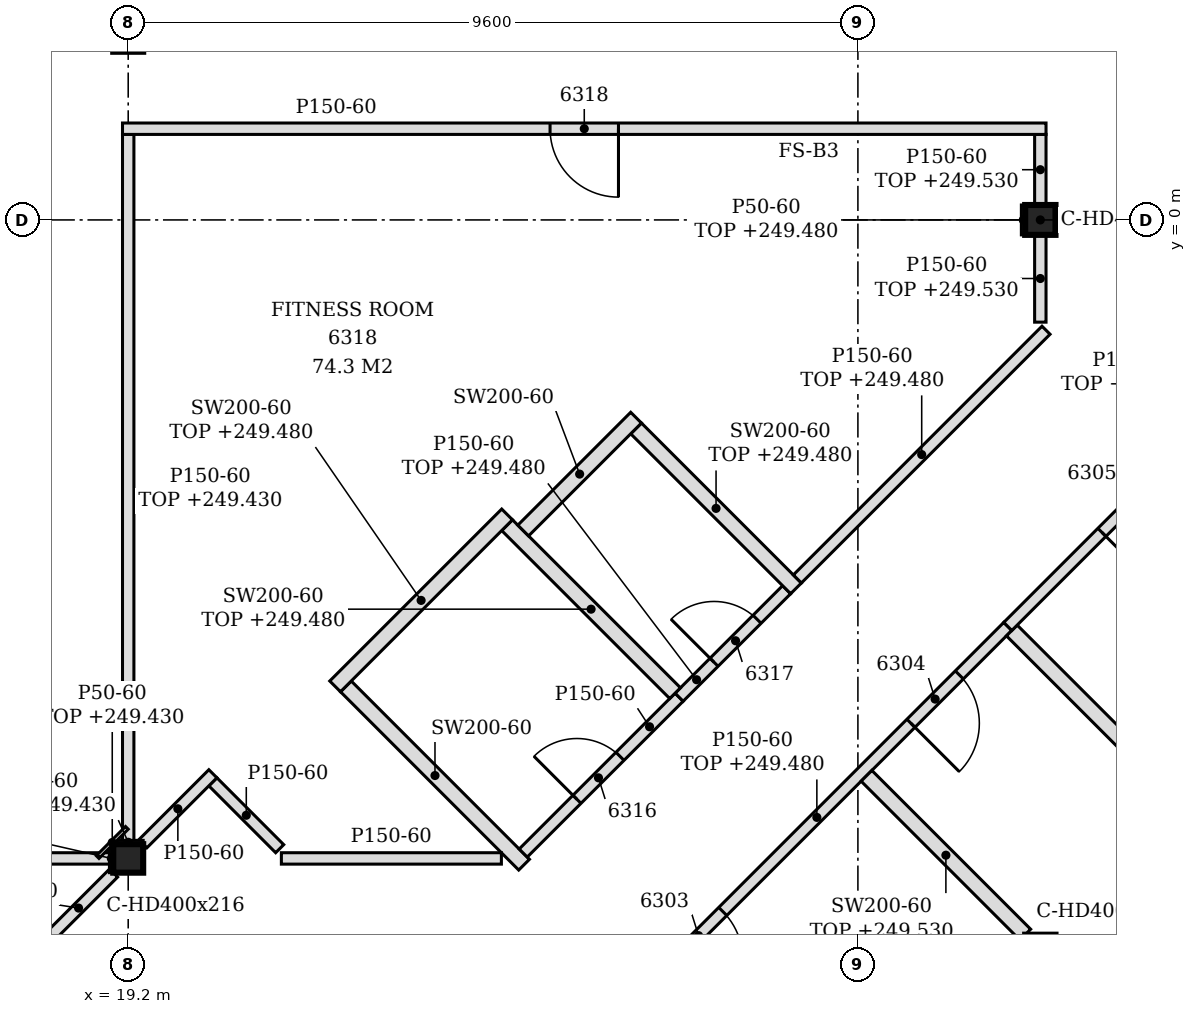
"""IFC4 building model, lengths in metres.
Left out: names, types, materials, properties, quantities, classifications, styles, units other than length and angle.
Written with IfcOpenShell. Run it as: python <this file> out.ifc"""

import sys

from ifc_helpers import new_model, si_unit, direction, frame, frame_2d, origin, origin_2d, place, context, subcontext, project, spatial, polyline, rectangle, i_section, outline, extrude, element, fill, save


model = new_model("IFC4")
c1 = context("Model", 3, precision=1e-05, world=origin(), true_north=direction((0.0, 1.0)))
c2 = subcontext(c1, "Body", "Model", "MODEL_VIEW")
j1 = project(units=[si_unit("LENGTHUNIT", "METRE"), si_unit("PLANEANGLEUNIT", "RADIAN")], contexts=[c1])
p1 = place(None, origin())
s1 = spatial("IfcSite", under=j1, at=p1, CompositionType="ELEMENT")
p2 = place(p1, origin())
s2 = spatial("IfcBuilding", under=s1, at=p2, CompositionType="ELEMENT")
p3 = place(p2, frame((0.0, 0.0, 246.6)))
s3 = spatial("IfcBuildingStorey", under=s2, at=p3, CompositionType="ELEMENT", Elevation=246.6)
p4 = place(p3, frame((19.2, -8.4, -0.15), z_axis=(0.0, 0.0, 1.0), x_axis=(1.0, 0.0, 0.0)))
e1 = element("IfcColumn", 1, at=p4, inside=s3, PredefinedType="COLUMN", context=c2, shape_type="SweptSolid", body=[
    extrude(i_section(OverallWidth=0.394, OverallDepth=0.375, WebThickness=0.017, FlangeThickness=0.028, FilletRadius=0.015, at=origin_2d()), origin(), (0.0, 0.0, 1.0), 3.6),
])
p5 = place(p3, frame((31.2, 0.0, -0.15), z_axis=(0.0, 0.0, 1.0), x_axis=(1.0, 0.0, 0.0)))
e2 = element("IfcColumn", 2, at=p5, inside=s3, PredefinedType="COLUMN", context=c2, shape_type="SweptSolid", body=[
    extrude(i_section(OverallWidth=0.399, OverallDepth=0.393, WebThickness=0.023, FlangeThickness=0.037, FilletRadius=0.015, at=origin_2d()), origin(), (0.0, 0.0, 1.0), 3.6),
])
p6 = place(p3, frame((24.619, -11.501, 0.0), z_axis=(0.0, 0.0, 1.0), x_axis=(0.707106781187, 0.707106781187, 0.0)))
e3 = element("IfcWall", 3, at=p6, inside=s3, PredefinedType="PARTITIONING", context=c2, shape_type="SweptSolid", body=[
    extrude(rectangle(XDim=8.702, YDim=0.15, at=frame_2d((4.351, 0.0))), origin(), (0.0, 0.0, 1.0), 2.88),
])
p7 = place(p6, frame((2.499, 0.0, 0.0)))
e4 = element("IfcOpeningElement", 4, at=p7, cuts=e3, PredefinedType="OPENING", context=c2, shape_type="SweptSolid", body=[
    extrude(rectangle(XDim=0.9, YDim=2.1, at=frame_2d((0.45, 1.05))), frame((0.0, 0.085, 0.0), z_axis=(0.0, -1.0, 0.0), x_axis=(1.0, 0.0, 0.0)), (0.0, 0.0, 1.0), 0.17),
])
p8 = place(p6, frame((6.9, 0.0, 0.0)))
e5 = element("IfcOpeningElement", 5, at=p8, cuts=e3, PredefinedType="OPENING", context=c2, shape_type="SweptSolid", body=[
    extrude(rectangle(XDim=0.9, YDim=2.1, at=frame_2d((0.45, 1.05))), frame((0.0, 0.085, 0.0), z_axis=(0.0, -1.0, 0.0), x_axis=(1.0, 0.0, 0.0)), (0.0, 0.0, 1.0), 0.17),
])
p9 = place(p3, frame((35.873, -10.449, 0.0), z_axis=(0.0, 0.0, 1.0), x_axis=(-0.707089680867, 0.707123881093, 0.0)))
e6 = element("IfcWall", 6, at=p9, inside=s3, PredefinedType="PARTITIONING", context=c2, shape_type="SweptSolid", body=[
    extrude(rectangle(XDim=7.139, YDim=0.2, at=frame_2d((3.569, 0.0))), origin(), (0.0, 0.0, 1.0), 2.93),
])
p10 = place(p3, frame((18.086, -9.514, 0.0), z_axis=(0.0, 0.0, 1.0), x_axis=(0.707200419109, 0.707013130862, 0.0)))
e7 = element("IfcWall", 7, at=p10, inside=s3, PredefinedType="PARTITIONING", context=c2, shape_type="SweptSolid", body=[
    extrude(rectangle(XDim=1.303, YDim=0.15, at=frame_2d((0.652, 0.0))), origin(), (0.0, 0.0, 1.0), 3.45),
])
p11 = place(p3, frame((31.002, -9.402, 0.0), z_axis=(0.0, 0.0, 1.0), x_axis=(-0.707065460118, 0.70714809984, 0.0)))
e8 = element("IfcWall", 8, at=p11, inside=s3, PredefinedType="PARTITIONING", context=c2, shape_type="SweptSolid", body=[
    extrude(rectangle(XDim=2.954, YDim=0.2, at=frame_2d((1.477, 0.0))), origin(), (0.0, 0.0, 1.0), 2.93),
])
p12 = place(p3, frame((24.408, -8.482, 0.0), z_axis=(0.0, 0.0, 1.0), x_axis=(-0.70692272029, 0.707290794184, 0.0)))
e9 = element("IfcWall", 9, at=p12, inside=s3, PredefinedType="PARTITIONING", context=c2, shape_type="SweptSolid", body=[
    extrude(rectangle(XDim=3.316, YDim=0.2, at=frame_2d((1.658, 0.0))), origin(), (0.0, 0.0, 1.0), 3.45),
])
p13 = place(p3, frame((7.397, -8.4, 0.0), z_axis=(0.0, 0.0, 1.0), x_axis=(1.0, 0.0, 0.0)))
e10 = element("IfcWall", 10, at=p13, inside=s3, PredefinedType="PARTITIONING", context=c2, shape_type="SweptSolid", body=[
    extrude(rectangle(XDim=11.606, YDim=0.15, at=frame_2d((5.803, 0.0))), origin(), (0.0, 0.0, 1.0), 2.83),
])
p14 = place(p3, frame((21.215, -8.4, 0.0), z_axis=(0.0, 0.0, 1.0), x_axis=(1.0, 0.0, 0.0)))
e11 = element("IfcWall", 11, at=p14, inside=s3, PredefinedType="PARTITIONING", context=c2, shape_type="SweptSolid", body=[
    extrude(rectangle(XDim=2.895, YDim=0.15, at=frame_2d((1.447, 0.0))), origin(), (0.0, 0.0, 1.0), 3.45),
])
p15 = place(p3, frame((21.193, -8.272, 0.0), z_axis=(0.0, 0.0, 1.0), x_axis=(-0.706812296552, 0.70740114323, 0.0)))
e12 = element("IfcWall", 12, at=p15, inside=s3, PredefinedType="PARTITIONING", context=c2, shape_type="SweptSolid", body=[
    extrude(rectangle(XDim=1.244, YDim=0.15, at=frame_2d((0.622, 0.0))), origin(), (0.0, 0.0, 1.0), 3.45),
])
p16 = place(p3, frame((24.397, -8.329, 0.0), z_axis=(0.0, 0.0, 1.0), x_axis=(0.707275119896, 0.706938402391, 0.0)))
e13 = element("IfcWall", 13, at=p16, inside=s3, PredefinedType="PARTITIONING", context=c2, shape_type="SweptSolid", body=[
    extrude(rectangle(XDim=2.9, YDim=0.15, at=frame_2d((1.45, 0.0))), origin(), (0.0, 0.0, 1.0), 3.45),
])
p17 = place(p16, frame((1.0, 0.0, 0.0)))
e14 = element("IfcOpeningElement", 14, at=p17, cuts=e13, PredefinedType="OPENING", context=c2, shape_type="SweptSolid", body=[
    extrude(rectangle(XDim=0.8, YDim=2.1, at=frame_2d((0.4, 1.05))), frame((0.0, 0.085, 0.0), z_axis=(0.0, -1.0, 0.0), x_axis=(1.0, 0.0, 0.0)), (0.0, 0.0, 1.0), 0.17),
])
p18 = place(p3, frame((19.2, -8.212, 0.0), z_axis=(0.0, 0.0, 1.0), x_axis=(0.0, 1.0, 0.0)))
e15 = element("IfcWall", 15, at=p18, inside=s3, PredefinedType="PARTITIONING", context=c2, shape_type="SweptSolid", body=[
    extrude(rectangle(XDim=9.337, YDim=0.15, at=frame_2d((4.669, 0.0))), origin(), (0.0, 0.0, 1.0), 2.83),
])
p19 = place(p3, frame((19.392, -8.208, 0.0), z_axis=(0.0, 0.0, 1.0), x_axis=(0.707106781187, 0.707106781187, 0.0)))
e16 = element("IfcWall", 16, at=p19, inside=s3, PredefinedType="PARTITIONING", context=c2, shape_type="SweptSolid", body=[
    extrude(rectangle(XDim=1.304, YDim=0.15, at=frame_2d((0.652, 0.0))), origin(), (0.0, 0.0, 1.0), 3.45),
])
p20 = place(p3, frame((26.448, -6.279, 0.0), z_axis=(0.0, 0.0, 1.0), x_axis=(0.707106781187, 0.707106781187, 0.0)))
e17 = element("IfcWall", 17, at=p20, inside=s3, PredefinedType="PARTITIONING", context=c2, shape_type="SweptSolid", body=[
    extrude(rectangle(XDim=2.0, YDim=0.15, at=frame_2d((1.0, 0.0))), origin(), (0.0, 0.0, 1.0), 2.88),
])
p21 = place(p20, frame((0.65, 0.0, 0.0)))
e18 = element("IfcOpeningElement", 18, at=p21, cuts=e17, PredefinedType="OPENING", context=c2, shape_type="SweptSolid", body=[
    extrude(rectangle(XDim=0.8, YDim=2.1, at=frame_2d((0.4, 1.05))), frame((0.0, 0.085, 0.0), z_axis=(0.0, -1.0, 0.0), x_axis=(1.0, 0.0, 0.0)), (0.0, 0.0, 1.0), 0.17),
])
p22 = place(p3, frame((26.395, -6.226, 0.0), z_axis=(0.0, 0.0, 1.0), x_axis=(-0.707067728538, 0.707145831678, 0.0)))
e19 = element("IfcWall", 19, at=p22, inside=s3, PredefinedType="PARTITIONING", context=c2, shape_type="SweptSolid", body=[
    extrude(rectangle(XDim=3.126, YDim=0.2, at=frame_2d((1.563, 0.0))), origin(), (0.0, 0.0, 1.0), 2.88),
])
p23 = place(p3, frame((21.922, -6.137, 0.0), z_axis=(0.0, 0.0, 1.0), x_axis=(0.707106781187, 0.707106781187, 0.0)))
e20 = element("IfcWall", 20, at=p23, inside=s3, PredefinedType="PARTITIONING", context=c2, shape_type="SweptSolid", body=[
    extrude(rectangle(XDim=3.2, YDim=0.2, at=frame_2d((1.6, 0.0))), origin(), (0.0, 0.0, 1.0), 2.88),
])
p24 = place(p3, frame((30.772, -5.348, 0.0), z_axis=(0.0, 0.0, 1.0), x_axis=(0.70724543229, 0.706968102891, 0.0)))
e21 = element("IfcWall", 21, at=p24, inside=s3, PredefinedType="PARTITIONING", context=c2, shape_type="SweptSolid", body=[
    extrude(rectangle(XDim=4.402, YDim=0.15, at=frame_2d((2.201, 0.0))), origin(), (0.0, 0.0, 1.0), 2.93),
])
p25 = place(p24, frame((1.751, 0.0, 0.0)))
e22 = element("IfcOpeningElement", 22, at=p25, cuts=e21, PredefinedType="OPENING", context=c2, shape_type="SweptSolid", body=[
    extrude(rectangle(XDim=0.9, YDim=2.1, at=frame_2d((0.45, 1.05))), frame((0.0, 0.085, 0.0), z_axis=(0.0, -1.0, 0.0), x_axis=(1.0, 0.0, 0.0)), (0.0, 0.0, 1.0), 0.17),
])
p26 = place(p3, frame((27.986, -4.847, 0.0), z_axis=(0.0, 0.0, 1.0), x_axis=(-0.707147797851, 0.707065762143, 0.0)))
e23 = element("IfcWall", 23, at=p26, inside=s3, PredefinedType="PARTITIONING", context=c2, shape_type="SweptSolid", body=[
    extrude(rectangle(XDim=2.976, YDim=0.2, at=frame_2d((1.488, 0.0))), origin(), (0.0, 0.0, 1.0), 2.88),
])
p27 = place(p3, frame((28.004, -4.723, 0.0), z_axis=(0.0, 0.0, 1.0), x_axis=(0.706974860744, 0.707238677022, 0.0)))
e24 = element("IfcWall", 24, at=p27, inside=s3, PredefinedType="PARTITIONING", context=c2, shape_type="SweptSolid", body=[
    extrude(rectangle(XDim=4.627, YDim=0.15, at=frame_2d((2.313, 0.0))), origin(), (0.0, 0.0, 1.0), 2.88),
])
p28 = place(p3, frame((24.397, -4.086, 0.0), z_axis=(0.0, 0.0, 1.0), x_axis=(0.707106781187, 0.707106781187, 0.0)))
e25 = element("IfcWall", 25, at=p28, inside=s3, PredefinedType="PARTITIONING", context=c2, shape_type="SweptSolid", body=[
    extrude(rectangle(XDim=2.1, YDim=0.2, at=frame_2d((1.05, 0.0))), origin(), (0.0, 0.0, 1.0), 3.45),
])
p29 = place(p3, frame((31.2, -1.345, 0.0), z_axis=(0.0, 0.0, 1.0), x_axis=(0.0, 1.0, 0.0)))
e26 = element("IfcWall", 26, at=p29, inside=s3, PredefinedType="PARTITIONING", context=c2, shape_type="SweptSolid", body=[
    extrude(rectangle(XDim=1.148, YDim=0.15, at=frame_2d((0.574, 0.0))), origin(), (0.0, 0.0, 1.0), 2.93),
])
p30 = place(p3, frame((31.2, 0.197, 0.0), z_axis=(0.0, 0.0, 1.0), x_axis=(0.0, 1.0, 0.0)))
e27 = element("IfcWall", 27, at=p30, inside=s3, PredefinedType="PARTITIONING", context=c2, shape_type="SweptSolid", body=[
    extrude(rectangle(XDim=0.928, YDim=0.15, at=frame_2d((0.464, 0.0))), origin(), (0.0, 0.0, 1.0), 2.93),
])
p31 = place(p3, frame((34.8, 0.994, 0.0), z_axis=(0.0, 0.0, 1.0), x_axis=(-0.707099634543, 0.707113927758, 0.0)))
e28 = element("IfcWall", 28, at=p31, inside=s3, PredefinedType="PARTITIONING", context=c2, shape_type="SweptSolid", body=[
    extrude(rectangle(XDim=17.081, YDim=0.15, at=frame_2d((8.541, 0.0))), origin(), (0.0, 0.0, 1.0), 2.88),
])
p32 = place(p31, frame((3.276, 0.0, 0.0)))
e29 = element("IfcOpeningElement", 29, at=p32, cuts=e28, PredefinedType="OPENING", context=c2, shape_type="SweptSolid", body=[
    extrude(rectangle(XDim=0.9, YDim=2.1, at=frame_2d((0.45, 1.05))), frame((0.0, 0.085, 0.0), z_axis=(0.0, -1.0, 0.0), x_axis=(1.0, 0.0, 0.0)), (0.0, 0.0, 1.0), 0.17),
])
p33 = place(p31, frame((6.829, 0.0, 0.0)))
e30 = element("IfcOpeningElement", 30, at=p33, cuts=e28, PredefinedType="OPENING", context=c2, shape_type="SweptSolid", body=[
    extrude(rectangle(XDim=0.9, YDim=2.1, at=frame_2d((0.45, 1.05))), frame((0.0, 0.085, 0.0), z_axis=(0.0, -1.0, 0.0), x_axis=(1.0, 0.0, 0.0)), (0.0, 0.0, 1.0), 0.17),
])
p34 = place(p31, frame((11.23, 0.0, 0.0)))
e31 = element("IfcOpeningElement", 31, at=p34, cuts=e28, PredefinedType="OPENING", context=c2, shape_type="SweptSolid", body=[
    extrude(rectangle(XDim=0.9, YDim=2.1, at=frame_2d((0.45, 1.05))), frame((0.0, 0.085, 0.0), z_axis=(0.0, -1.0, 0.0), x_axis=(1.0, 0.0, 0.0)), (0.0, 0.0, 1.0), 0.17),
])
p35 = place(p3, frame((19.125, 1.2, 0.0), z_axis=(0.0, 0.0, 1.0), x_axis=(1.0, 0.0, 0.0)))
e32 = element("IfcWall", 32, at=p35, inside=s3, PredefinedType="PARTITIONING", context=c2, shape_type="SweptSolid", body=[
    extrude(outline(polyline([(0.0, 0.0), (12.15, 0.0), (12.15, 2.93), (11.925, 2.93), (11.923, 3.45), (0.225, 3.45), (0.223, 2.83), (0.0, 2.83), (0.0, 0.0)])), frame((0.0, 0.075, 0.0), z_axis=(0.0, -1.0, 0.0), x_axis=(1.0, 0.0, 0.0)), (0.0, 0.0, 1.0), 0.15),
])
p36 = place(p35, frame((5.625, 0.0, 0.0)))
e33 = element("IfcOpeningElement", 33, at=p36, cuts=e32, PredefinedType="OPENING", context=c2, shape_type="SweptSolid", body=[
    extrude(rectangle(XDim=0.9, YDim=2.1, at=frame_2d((0.45, 1.05))), frame((0.0, 0.085, 0.0), z_axis=(0.0, -1.0, 0.0), x_axis=(1.0, 0.0, 0.0)), (0.0, 0.0, 1.0), 0.17),
])
p37 = place(p3, frame((18.798, -8.382, 0.0), z_axis=(0.0, 0.0, 1.0), x_axis=(0.707106781187, 0.707106781187, 0.0)))
e34 = element("IfcWall", 34, at=p37, inside=s3, PredefinedType="PARTITIONING", context=c2, shape_type="SweptSolid", body=[
    extrude(rectangle(XDim=0.544, YDim=0.05, at=frame_2d((0.272, 0.0))), origin(), (0.0, 0.0, 1.0), 2.83),
])
p38 = place(p3, frame((19.003, -8.188, 0.0), z_axis=(0.0, 0.0, 1.0), x_axis=(1.0, 0.0, 0.0)))
e35 = element("IfcWall", 35, at=p38, inside=s3, PredefinedType="PARTITIONING", context=c2, shape_type="SweptSolid", body=[
    extrude(rectangle(XDim=0.394, YDim=0.05, at=frame_2d((0.197, 0.0))), origin(), (0.0, 0.0, 1.0), 2.83),
])
p39 = place(p3, frame((18.978, -8.587, 0.0), z_axis=(0.0, 0.0, 1.0), x_axis=(0.0, 1.0, 0.0)))
e36 = element("IfcWall", 36, at=p39, inside=s3, PredefinedType="PARTITIONING", context=c2, shape_type="SweptSolid", body=[
    extrude(rectangle(XDim=0.375, YDim=0.05, at=frame_2d((0.188, 0.0))), origin(), (0.0, 0.0, 1.0), 2.83),
])
p40 = place(p3, frame((30.976, -0.197, 0.0), z_axis=(0.0, 0.0, 1.0), x_axis=(0.0, 1.0, 0.0)))
e37 = element("IfcWall", 37, at=p40, inside=s3, PredefinedType="PARTITIONING", context=c2, shape_type="SweptSolid", body=[
    extrude(rectangle(XDim=0.393, YDim=0.05, at=frame_2d((0.197, 0.0))), origin(), (0.0, 0.0, 1.0), 2.88),
])
p41 = place(p7, frame((0.9, 0.0, 0.0), z_axis=(0.0, 0.0, 1.0), x_axis=(-1.0, 0.0, 0.0)))
e38 = element("IfcDoor", 38, at=p41, inside=s3, OperationType="SINGLE_SWING_RIGHT", PredefinedType="DOOR", context=c2, shape_type="SweptSolid", body=[
    extrude(rectangle(XDim=0.9, YDim=2.1, at=frame_2d((0.45, 1.05))), frame((0.0, 0.025, 0.0), z_axis=(0.0, -1.0, 0.0), x_axis=(1.0, 0.0, 0.0)), (0.0, 0.0, 1.0), 0.05),
])
fill(e4, e38)
p42 = place(p8, frame((0.9, 0.0, 0.0), z_axis=(0.0, 0.0, 1.0), x_axis=(-1.0, 0.0, 0.0)))
e39 = element("IfcDoor", 39, at=p42, inside=s3, OperationType="SINGLE_SWING_RIGHT", PredefinedType="DOOR", context=c2, shape_type="SweptSolid", body=[
    extrude(rectangle(XDim=0.9, YDim=2.1, at=frame_2d((0.45, 1.05))), frame((0.0, 0.025, 0.0), z_axis=(0.0, -1.0, 0.0), x_axis=(1.0, 0.0, 0.0)), (0.0, 0.0, 1.0), 0.05),
])
fill(e5, e39)
p43 = place(p25, frame((0.9, 0.0, 0.0), z_axis=(0.0, 0.0, 1.0), x_axis=(-1.0, 0.0, 0.0)))
e40 = element("IfcDoor", 40, at=p43, inside=s3, OperationType="SINGLE_SWING_RIGHT", PredefinedType="DOOR", context=c2, shape_type="SweptSolid", body=[
    extrude(rectangle(XDim=0.9, YDim=2.1, at=frame_2d((0.45, 1.05))), frame((0.0, 0.025, 0.0), z_axis=(0.0, -1.0, 0.0), x_axis=(1.0, 0.0, 0.0)), (0.0, 0.0, 1.0), 0.05),
])
fill(e22, e40)
p44 = place(p17, origin())
e41 = element("IfcDoor", 41, at=p44, inside=s3, OperationType="SINGLE_SWING_LEFT", PredefinedType="DOOR", context=c2, shape_type="SweptSolid", body=[
    extrude(rectangle(XDim=0.8, YDim=2.1, at=frame_2d((0.4, 1.05))), frame((0.0, 0.025, 0.0), z_axis=(0.0, -1.0, 0.0), x_axis=(1.0, 0.0, 0.0)), (0.0, 0.0, 1.0), 0.05),
])
fill(e14, e41)
p45 = place(p21, origin())
e42 = element("IfcDoor", 42, at=p45, inside=s3, OperationType="SINGLE_SWING_LEFT", PredefinedType="DOOR", context=c2, shape_type="SweptSolid", body=[
    extrude(rectangle(XDim=0.8, YDim=2.1, at=frame_2d((0.4, 1.05))), frame((0.0, 0.025, 0.0), z_axis=(0.0, -1.0, 0.0), x_axis=(1.0, 0.0, 0.0)), (0.0, 0.0, 1.0), 0.05),
])
fill(e18, e42)
p46 = place(p36, frame((0.9, 0.0, 0.0), z_axis=(0.0, 0.0, 1.0), x_axis=(-1.0, 0.0, 0.0)))
e43 = element("IfcDoor", 43, at=p46, inside=s3, OperationType="SINGLE_SWING_LEFT", PredefinedType="DOOR", context=c2, shape_type="SweptSolid", body=[
    extrude(rectangle(XDim=0.9, YDim=2.1, at=frame_2d((0.45, 1.05))), frame((0.0, 0.025, 0.0), z_axis=(0.0, -1.0, 0.0), x_axis=(1.0, 0.0, 0.0)), (0.0, 0.0, 1.0), 0.05),
])
fill(e33, e43)
save(model, sys.argv[1])
